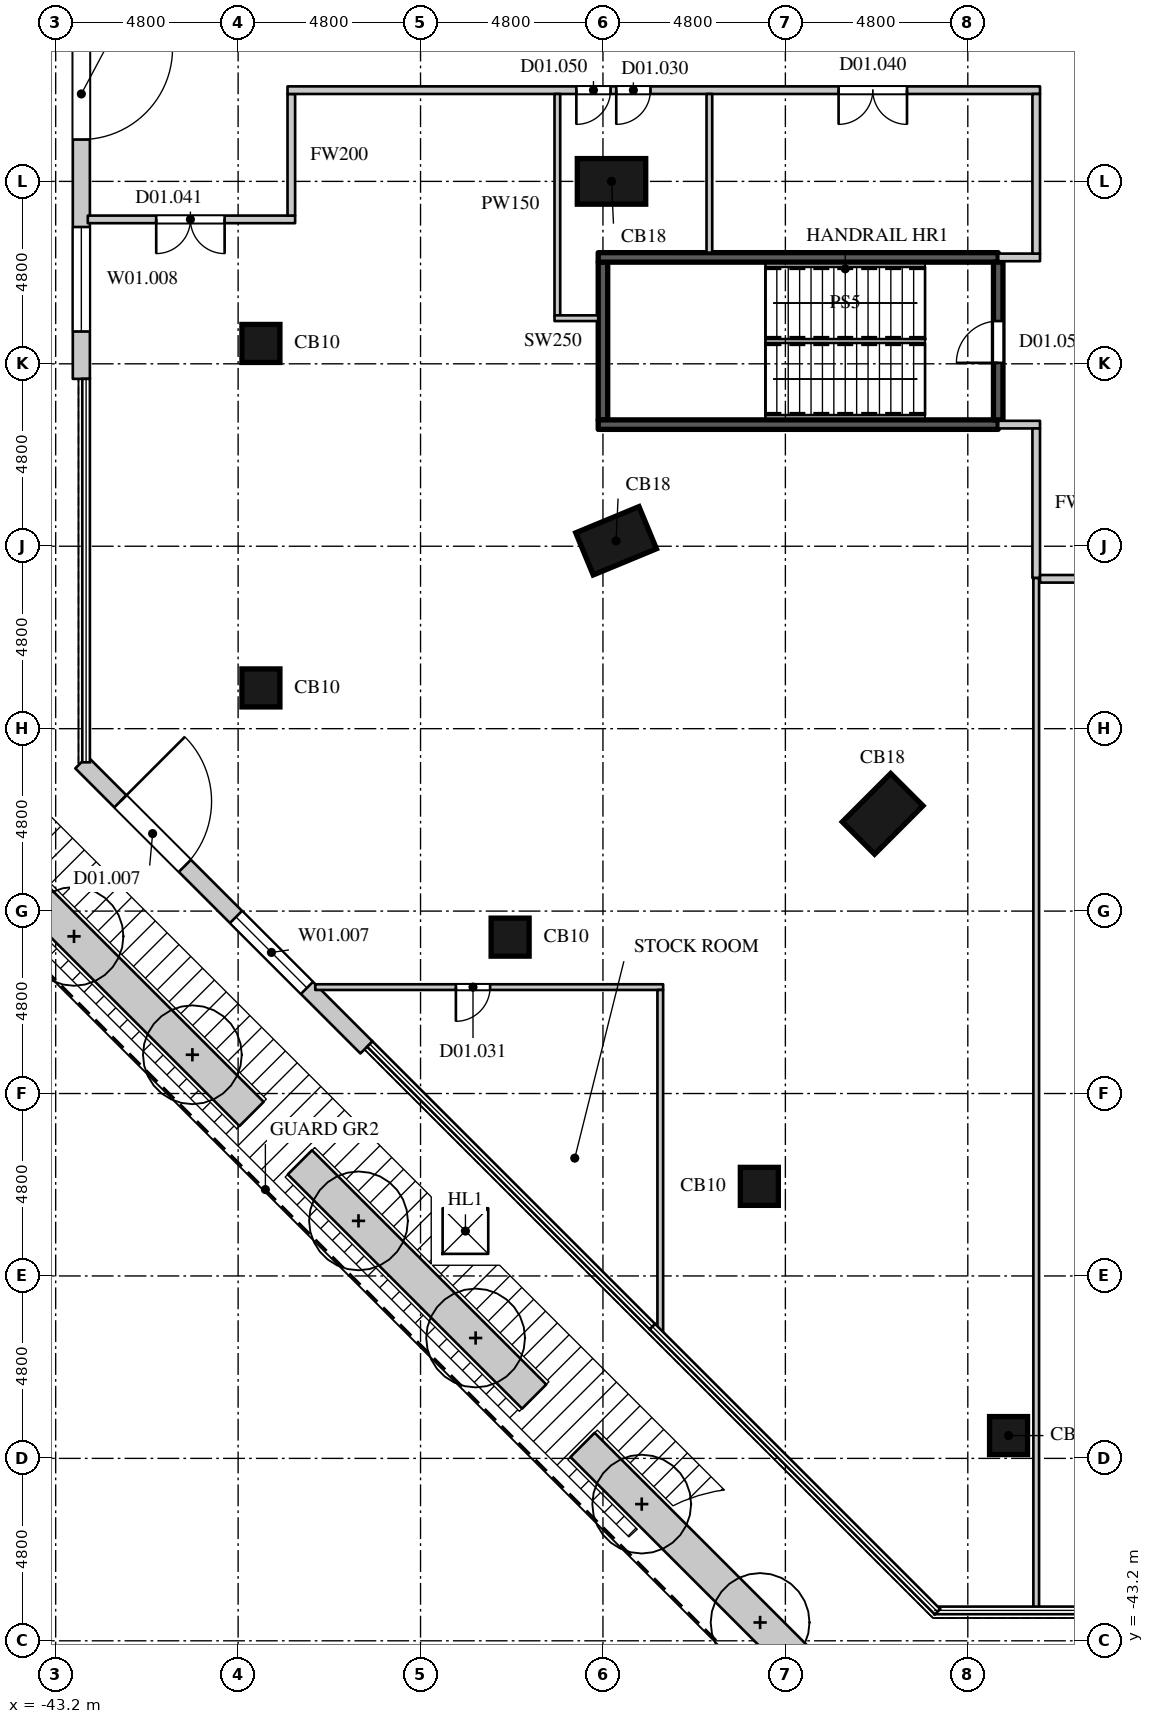
"""IFC4 building model, lengths in metres.
Left out: names, types, materials, properties, quantities, classifications, styles, units other than length and angle.
Written with IfcOpenShell. Run it as: python <this file> out.ifc"""

import sys

from ifc_helpers import new_model, si_unit, direction, frame, frame_2d, origin, origin_2d, place, context, subcontext, project, spatial, rectangle, extrude, element, fill, save


model = new_model("IFC4")
c1 = context("Model", 3, precision=1e-05, world=origin(), true_north=direction((0.0, 1.0)))
c2 = subcontext(c1, "Body", "Model", "MODEL_VIEW")
j1 = project(units=[si_unit("LENGTHUNIT", "METRE"), si_unit("PLANEANGLEUNIT", "RADIAN")], contexts=[c1])
p1 = place(None, origin())
s1 = spatial("IfcSite", under=j1, at=p1, CompositionType="ELEMENT")
p2 = place(p1, origin())
s2 = spatial("IfcBuilding", under=s1, at=p2, CompositionType="ELEMENT")
p3 = place(p2, frame((0.0, 0.0, 6.0)))
s3 = spatial("IfcBuildingStorey", under=s2, at=p3, CompositionType="ELEMENT", Elevation=6.0)
for number, where, z_axis, x_axis in (
    (1, (-18.128, -37.8, 0.0), (0.0, 0.0, 1.0), (1.0, 0.0, 0.0)),
    (2, (-24.685, -31.243, 0.0), (0.0, 0.0, 1.0), (1.0, 0.0, 0.0)),
    (3, (-31.243, -24.685, 0.0), (0.0, 0.0, 1.0), (1.0, 0.0, 0.0)),
):
    element("IfcColumn", number, at=place(p3, frame(where, z_axis=z_axis, x_axis=x_axis)), inside=s3, PredefinedType="COLUMN", context=c2, shape_type="SweptSolid", body=[
        extrude(rectangle(XDim=1.0, YDim=1.0, at=origin_2d()), origin(), (0.0, 0.0, 1.0), 5.0),
    ])
p4 = place(p3, frame((-21.441, -21.441, 0.0), z_axis=(0.0, 0.0, 1.0), x_axis=(0.707106781187, -0.707106781187, 0.0)))
e4 = element("IfcColumn", 4, at=p4, inside=s3, PredefinedType="COLUMN", context=c2, shape_type="SweptSolid", body=[
    extrude(rectangle(XDim=1.2, YDim=1.8, at=origin_2d()), origin(), (0.0, 0.0, 1.0), 5.0),
])
p5 = place(p3, frame((-37.8, -18.128, 0.0), z_axis=(0.0, 0.0, 1.0), x_axis=(1.0, 0.0, 0.0)))
e5 = element("IfcColumn", 5, at=p5, inside=s3, PredefinedType="COLUMN", context=c2, shape_type="SweptSolid", body=[
    extrude(rectangle(XDim=1.0, YDim=1.0, at=origin_2d()), origin(), (0.0, 0.0, 1.0), 5.0),
])
p6 = place(p3, frame((-28.454, -14.257, 0.0), z_axis=(0.0, 0.0, 1.0), x_axis=(0.382683496864, -0.923879505795, 0.0)))
e6 = element("IfcColumn", 6, at=p6, inside=s3, PredefinedType="COLUMN", context=c2, shape_type="SweptSolid", body=[
    extrude(rectangle(XDim=1.2, YDim=1.8, at=origin_2d()), origin(), (0.0, 0.0, 1.0), 5.0),
])
p7 = place(p3, frame((-37.8, -9.064, 0.0), z_axis=(0.0, 0.0, 1.0), x_axis=(1.0, 0.0, 0.0)))
e7 = element("IfcColumn", 7, at=p7, inside=s3, PredefinedType="COLUMN", context=c2, shape_type="SweptSolid", body=[
    extrude(rectangle(XDim=1.0, YDim=1.0, at=origin_2d()), origin(), (0.0, 0.0, 1.0), 5.0),
])
p8 = place(p3, frame((-28.575, -4.8, 0.0), z_axis=(0.0, 0.0, 1.0), x_axis=(0.0, -1.0, 0.0)))
e8 = element("IfcColumn", 8, at=p8, inside=s3, PredefinedType="COLUMN", context=c2, shape_type="SweptSolid", body=[
    extrude(rectangle(XDim=1.2, YDim=1.8, at=origin_2d()), origin(), (0.0, 0.0, 1.0), 5.0),
])
p9 = place(p3, frame((-42.525, 0.0, 0.0), z_axis=(0.0, 0.0, 1.0), x_axis=(0.0, -1.0, 0.0)))
e9 = element("IfcWall", 9, at=p9, inside=s3, PredefinedType="ELEMENTEDWALL", context=c2, shape_type="SweptSolid", body=[
    extrude(rectangle(XDim=9.996, YDim=0.45, at=frame_2d((4.998, 0.0))), origin(), (0.0, 0.0, 1.0), 4.7),
])
p10 = place(p9, frame((1.299, 0.0, 0.0)))
e10 = element("IfcOpeningElement", 10, at=p10, cuts=e9, PredefinedType="OPENING", context=c2, shape_type="SweptSolid", body=[
    extrude(rectangle(XDim=2.4, YDim=2.7, at=frame_2d((1.2, 1.35))), frame((0.0, 0.235, 0.0), z_axis=(0.0, -1.0, 0.0), x_axis=(1.0, 0.0, 0.0)), (0.0, 0.0, 1.0), 0.47),
])
p11 = place(p9, frame((6.0, 0.0, 1.05)))
e11 = element("IfcOpeningElement", 11, at=p11, cuts=e9, PredefinedType="OPENING", context=c2, shape_type="SweptSolid", body=[
    extrude(rectangle(XDim=2.75, YDim=2.7, at=frame_2d((1.375, 1.35))), frame((0.0, 0.235, 0.0), z_axis=(0.0, -1.0, 0.0), x_axis=(1.0, 0.0, 0.0)), (0.0, 0.0, 1.0), 0.47),
])
p12 = place(p3, frame((-42.525, -20.085, 0.0), z_axis=(0.0, 0.0, 1.0), x_axis=(0.707106781187, -0.707106781187, 0.0)))
e12 = element("IfcWall", 12, at=p12, inside=s3, PredefinedType="ELEMENTEDWALL", context=c2, shape_type="SweptSolid", body=[
    extrude(rectangle(XDim=10.609, YDim=0.45, at=frame_2d((5.305, 0.0))), origin(), (0.0, 0.0, 1.0), 4.7),
])
p13 = place(p12, frame((1.452, 0.0, 0.0)))
e13 = element("IfcOpeningElement", 13, at=p13, cuts=e12, PredefinedType="OPENING", context=c2, shape_type="SweptSolid", body=[
    extrude(rectangle(XDim=2.4, YDim=2.7, at=frame_2d((1.2, 1.35))), frame((0.0, 0.235, 0.0), z_axis=(0.0, -1.0, 0.0), x_axis=(1.0, 0.0, 0.0)), (0.0, 0.0, 1.0), 0.47),
])
p14 = place(p12, frame((5.755, 0.0, 1.05)))
e14 = element("IfcOpeningElement", 14, at=p14, cuts=e12, PredefinedType="OPENING", context=c2, shape_type="SweptSolid", body=[
    extrude(rectangle(XDim=2.64, YDim=2.7, at=frame_2d((1.32, 1.35))), frame((0.0, 0.235, 0.0), z_axis=(0.0, -1.0, 0.0), x_axis=(1.0, 0.0, 0.0)), (0.0, 0.0, 1.0), 0.47),
])
p15 = place(p3, frame((-44.275, -23.108, 0.0), z_axis=(0.0, 0.0, 1.0), x_axis=(0.707106781187, -0.707106781187, 0.0)))
e15 = element("IfcWall", 15, at=p15, inside=s3, PredefinedType="USERDEFINED", context=c2, shape_type="SweptSolid", body=[
    extrude(rectangle(XDim=8.81, YDim=0.9, at=frame_2d((4.405, 0.0))), origin(), (0.0, 0.0, 1.0), 0.9),
])
p16 = place(p3, frame((-36.773, -30.61, 0.0), z_axis=(0.0, 0.0, 1.0), x_axis=(0.707106781187, -0.707106781187, 0.0)))
e16 = element("IfcWall", 16, at=p16, inside=s3, PredefinedType="USERDEFINED", context=c2, shape_type="SweptSolid", body=[
    extrude(rectangle(XDim=8.716, YDim=0.9, at=frame_2d((4.358, 0.0))), origin(), (0.0, 0.0, 1.0), 0.9),
])
p17 = place(p3, frame((-29.337, -38.046, 0.0), z_axis=(0.0, 0.0, 1.0), x_axis=(0.707106781187, -0.707106781187, 0.0)))
e17 = element("IfcWall", 17, at=p17, inside=s3, PredefinedType="USERDEFINED", context=c2, shape_type="SweptSolid", body=[
    extrude(rectangle(XDim=8.81, YDim=0.9, at=frame_2d((4.405, 0.0))), origin(), (0.0, 0.0, 1.0), 0.9),
])
p18 = place(p3, frame((-42.355, -5.8, 0.0), z_axis=(0.0, 0.0, 1.0), x_axis=(1.0, 0.0, 0.0)))
e18 = element("IfcWall", 18, at=p18, inside=s3, PredefinedType="PARTITIONING", context=c2, shape_type="SweptSolid", body=[
    extrude(rectangle(XDim=5.455, YDim=0.2, at=frame_2d((2.728, 0.0))), origin(), (0.0, 0.0, 1.0), 4.4),
])
p19 = place(p18, frame((1.8, 0.0, 0.0)))
e19 = element("IfcOpeningElement", 19, at=p19, cuts=e18, PredefinedType="OPENING", context=c2, shape_type="SweptSolid", body=[
    extrude(rectangle(XDim=1.8, YDim=2.4, at=frame_2d((0.9, 1.2))), frame((0.0, 0.11, 0.0), z_axis=(0.0, -1.0, 0.0), x_axis=(1.0, 0.0, 0.0)), (0.0, 0.0, 1.0), 0.22),
])
p20 = place(p3, frame((-37.0, -5.7, 0.0), z_axis=(0.0, 0.0, 1.0), x_axis=(0.0, 1.0, 0.0)))
e20 = element("IfcWall", 20, at=p20, inside=s3, PredefinedType="PARTITIONING", context=c2, shape_type="SweptSolid", body=[
    extrude(rectangle(XDim=3.2, YDim=0.2, at=frame_2d((1.6, 0.0))), origin(), (0.0, 0.0, 1.0), 4.4),
])
p21 = place(p3, frame((-37.1, -2.4, 0.0), z_axis=(0.0, 0.0, 1.0), x_axis=(1.0, 0.0, 0.0)))
e21 = element("IfcWall", 21, at=p21, inside=s3, PredefinedType="PARTITIONING", context=c2, shape_type="SweptSolid", body=[
    extrude(rectangle(XDim=19.8, YDim=0.2, at=frame_2d((9.9, 0.0))), origin(), (0.0, 0.0, 1.0), 4.4),
])
p22 = place(p21, frame((8.65, 0.0, 0.0)))
e22 = element("IfcOpeningElement", 22, at=p22, cuts=e21, PredefinedType="OPENING", context=c2, shape_type="SweptSolid", body=[
    extrude(rectangle(XDim=0.9, YDim=2.2, at=frame_2d((0.45, 1.1))), frame((0.0, 0.11, 0.0), z_axis=(0.0, -1.0, 0.0), x_axis=(1.0, 0.0, 0.0)), (0.0, 0.0, 1.0), 0.22),
])
p23 = place(p21, frame((14.5, 0.0, 0.0)))
e23 = element("IfcOpeningElement", 23, at=p23, cuts=e21, PredefinedType="OPENING", context=c2, shape_type="SweptSolid", body=[
    extrude(rectangle(XDim=1.8, YDim=2.4, at=frame_2d((0.9, 1.2))), frame((0.0, 0.11, 0.0), z_axis=(0.0, -1.0, 0.0), x_axis=(1.0, 0.0, 0.0)), (0.0, 0.0, 1.0), 0.22),
])
p24 = place(p21, frame((7.6, 0.0, 0.0)))
e24 = element("IfcOpeningElement", 24, at=p24, cuts=e21, PredefinedType="OPENING", context=c2, shape_type="SweptSolid", body=[
    extrude(rectangle(XDim=0.9, YDim=2.2, at=frame_2d((0.45, 1.1))), frame((0.0, 0.11, 0.0), z_axis=(0.0, -1.0, 0.0), x_axis=(1.0, 0.0, 0.0)), (0.0, 0.0, 1.0), 0.22),
])
for number, where, z_axis, x_axis in (
    (25, (-18.4, -11.2, 0.0), (0.0, 0.0, 1.0), (1.0, 0.0, 0.0)),
    (26, (-18.4, -6.8, 0.0), (0.0, 0.0, 1.0), (1.0, 0.0, 0.0)),
):
    element("IfcWall", number, at=place(p3, frame(where, z_axis=z_axis, x_axis=x_axis)), inside=s3, PredefinedType="PARTITIONING", context=c2, shape_type="SweptSolid", body=[
        extrude(rectangle(XDim=1.1, YDim=0.2, at=frame_2d((0.55, 0.0))), origin(), (0.0, 0.0, 1.0), 4.4),
    ])
p25 = place(p3, frame((-17.4, -15.237, 0.0), z_axis=(0.0, 0.0, 1.0), x_axis=(0.0, 1.0, 0.0)))
e27 = element("IfcWall", 27, at=p25, inside=s3, PredefinedType="PARTITIONING", context=c2, shape_type="SweptSolid", body=[
    extrude(rectangle(XDim=3.937, YDim=0.2, at=frame_2d((1.968, 0.0))), origin(), (0.0, 0.0, 1.0), 4.4),
])
p26 = place(p3, frame((-17.3, -15.257, 0.0), z_axis=(0.0, 0.0, 1.0), x_axis=(1.0, 0.0, 0.0)))
e28 = element("IfcWall", 28, at=p26, inside=s3, PredefinedType="PARTITIONING", context=c2, shape_type="SweptSolid", body=[
    extrude(rectangle(XDim=6.2, YDim=0.2, at=frame_2d((3.1, 0.0))), origin(), (0.0, 0.0, 1.0), 4.4),
])
p27 = place(p26, frame((2.2, 0.0, 0.0)))
e29 = element("IfcOpeningElement", 29, at=p27, cuts=e28, PredefinedType="OPENING", context=c2, shape_type="SweptSolid", body=[
    extrude(rectangle(XDim=1.8, YDim=2.4, at=frame_2d((0.9, 1.2))), frame((0.0, 0.11, 0.0), z_axis=(0.0, -1.0, 0.0), x_axis=(1.0, 0.0, 0.0)), (0.0, 0.0, 1.0), 0.22),
])
p28 = place(p3, frame((-17.4, -6.7, 0.0), z_axis=(0.0, 0.0, 1.0), x_axis=(0.0, 1.0, 0.0)))
e30 = element("IfcWall", 30, at=p28, inside=s3, PredefinedType="PARTITIONING", context=c2, shape_type="SweptSolid", body=[
    extrude(rectangle(XDim=4.2, YDim=0.2, at=frame_2d((2.1, 0.0))), origin(), (0.0, 0.0, 1.0), 4.4),
])
p29 = place(p3, frame((-36.37, -26.0, 0.0), z_axis=(0.0, 0.0, 1.0), x_axis=(1.0, 0.0, 0.0)))
e31 = element("IfcWall", 31, at=p29, inside=s3, PredefinedType="PARTITIONING", context=c2, shape_type="SweptSolid", body=[
    extrude(rectangle(XDim=9.153, YDim=0.15, at=frame_2d((4.576, 0.0))), origin(), (0.0, 0.0, 1.0), 4.4),
])
p30 = place(p29, frame((3.7, 0.0, 0.0)))
e32 = element("IfcOpeningElement", 32, at=p30, cuts=e31, PredefinedType="OPENING", context=c2, shape_type="SweptSolid", body=[
    extrude(rectangle(XDim=0.9, YDim=2.2, at=frame_2d((0.45, 1.1))), frame((0.0, 0.085, 0.0), z_axis=(0.0, -1.0, 0.0), x_axis=(1.0, 0.0, 0.0)), (0.0, 0.0, 1.0), 0.17),
])
p31 = place(p3, frame((-30.0, -8.325, 0.0), z_axis=(0.0, 0.0, 1.0), x_axis=(0.0, 1.0, 0.0)))
e33 = element("IfcWall", 33, at=p31, inside=s3, PredefinedType="PARTITIONING", context=c2, shape_type="SweptSolid", body=[
    extrude(rectangle(XDim=5.825, YDim=0.15, at=frame_2d((2.913, 0.0))), origin(), (0.0, 0.0, 1.0), 4.4),
])
p32 = place(p3, frame((-30.075, -8.4, 0.0), z_axis=(0.0, 0.0, 1.0), x_axis=(1.0, 0.0, 0.0)))
e34 = element("IfcWall", 34, at=p32, inside=s3, PredefinedType="PARTITIONING", context=c2, shape_type="SweptSolid", body=[
    extrude(rectangle(XDim=1.15, YDim=0.15, at=frame_2d((0.575, 0.0))), origin(), (0.0, 0.0, 1.0), 4.4),
])
p33 = place(p3, frame((-27.292, -35.078, 0.0), z_axis=(0.0, 0.0, 1.0), x_axis=(0.0, 1.0, 0.0)))
e35 = element("IfcWall", 35, at=p33, inside=s3, PredefinedType="PARTITIONING", context=c2, shape_type="SweptSolid", body=[
    extrude(rectangle(XDim=9.003, YDim=0.15, at=frame_2d((4.501, 0.0))), origin(), (0.0, 0.0, 1.0), 4.4),
])
p34 = place(p3, frame((-26.0, -6.675, 0.0), z_axis=(0.0, 0.0, 1.0), x_axis=(0.0, 1.0, 0.0)))
e36 = element("IfcWall", 36, at=p34, inside=s3, PredefinedType="PARTITIONING", context=c2, shape_type="SweptSolid", body=[
    extrude(rectangle(XDim=4.175, YDim=0.15, at=frame_2d((2.087, 0.0))), origin(), (0.0, 0.0, 1.0), 4.4),
])
p35 = place(p3, frame((-17.4, -42.355, 0.0), z_axis=(0.0, 0.0, 1.0), x_axis=(0.0, 1.0, 0.0)))
e37 = element("IfcWall", 37, at=p35, inside=s3, PredefinedType="PARTITIONING", context=c2, shape_type="SweptSolid", body=[
    extrude(rectangle(XDim=27.118, YDim=0.15, at=frame_2d((13.559, 0.0))), origin(), (0.0, 0.0, 1.0), 4.4),
])
p36 = place(p3, frame((-28.8, -11.075, 0.0), z_axis=(0.0, 0.0, 1.0), x_axis=(0.0, 1.0, 0.0)))
e38 = element("IfcWall", 38, at=p36, inside=s3, PredefinedType="SHEAR", context=c2, shape_type="SweptSolid", body=[
    extrude(rectangle(XDim=4.15, YDim=0.25, at=frame_2d((2.075, 0.0))), origin(), (0.0, 0.0, 1.0), 4.65),
])
for number, where, z_axis, x_axis in (
    (39, (-28.925, -11.2, 0.0), (0.0, 0.0, 1.0), (1.0, 0.0, 0.0)),
    (40, (-28.925, -6.8, 0.0), (0.0, 0.0, 1.0), (1.0, 0.0, 0.0)),
):
    element("IfcWall", number, at=place(p3, frame(where, z_axis=z_axis, x_axis=x_axis)), inside=s3, PredefinedType="SHEAR", context=c2, shape_type="SweptSolid", body=[
        extrude(rectangle(XDim=10.525, YDim=0.25, at=frame_2d((5.263, 0.0))), origin(), (0.0, 0.0, 1.0), 4.65),
    ])
p37 = place(p3, frame((-18.4, -11.075, 0.0), z_axis=(0.0, 0.0, 1.0), x_axis=(0.0, 1.0, 0.0)))
e41 = element("IfcWall", 41, at=p37, inside=s3, PredefinedType="SHEAR", context=c2, shape_type="SweptSolid", body=[
    extrude(rectangle(XDim=4.15, YDim=0.25, at=frame_2d((2.075, 0.0))), origin(), (0.0, 0.0, 1.0), 4.65),
])
p38 = place(p37, frame((1.5, 0.0, 0.0)))
e42 = element("IfcOpeningElement", 42, at=p38, cuts=e41, PredefinedType="OPENING", context=c2, shape_type="SweptSolid", body=[
    extrude(rectangle(XDim=1.1, YDim=2.2, at=frame_2d((0.55, 1.1))), frame((0.0, 0.135, 0.0), z_axis=(0.0, -1.0, 0.0), x_axis=(1.0, 0.0, 0.0)), (0.0, 0.0, 1.0), 0.27),
])
p39 = place(p10, origin())
e43 = element("IfcDoor", 43, at=p39, inside=s3, OperationType="SINGLE_SWING_LEFT", PredefinedType="DOOR", context=c2, shape_type="SweptSolid", body=[
    extrude(rectangle(XDim=2.4, YDim=2.7, at=frame_2d((1.2, 1.35))), frame((0.0, 0.13, 0.0), z_axis=(0.0, -1.0, 0.0), x_axis=(1.0, 0.0, 0.0)), (0.0, 0.0, 1.0), 0.05),
])
fill(e10, e43)
p40 = place(p11, origin())
e44 = element("IfcWindow", 44, at=p40, inside=s3, PartitioningType="SINGLE_PANEL", PredefinedType="WINDOW", context=c2, shape_type="SweptSolid", body=[
    extrude(rectangle(XDim=2.75, YDim=2.7, at=frame_2d((1.375, 1.35))), frame((0.0, 0.135, 0.0), z_axis=(0.0, -1.0, 0.0), x_axis=(1.0, 0.0, 0.0)), (0.0, 0.0, 1.0), 0.06),
])
fill(e11, e44)
p41 = place(p13, origin())
e45 = element("IfcDoor", 45, at=p41, inside=s3, OperationType="SINGLE_SWING_LEFT", PredefinedType="DOOR", context=c2, shape_type="SweptSolid", body=[
    extrude(rectangle(XDim=2.4, YDim=2.7, at=frame_2d((1.2, 1.35))), frame((0.0, 0.13, 0.0), z_axis=(0.0, -1.0, 0.0), x_axis=(1.0, 0.0, 0.0)), (0.0, 0.0, 1.0), 0.05),
])
fill(e13, e45)
p42 = place(p14, origin())
e46 = element("IfcWindow", 46, at=p42, inside=s3, PartitioningType="SINGLE_PANEL", PredefinedType="WINDOW", context=c2, shape_type="SweptSolid", body=[
    extrude(rectangle(XDim=2.64, YDim=2.7, at=frame_2d((1.32, 1.35))), frame((0.0, 0.135, 0.0), z_axis=(0.0, -1.0, 0.0), x_axis=(1.0, 0.0, 0.0)), (0.0, 0.0, 1.0), 0.06),
])
fill(e14, e46)
p43 = place(p3, frame((0.0, 0.0, -0.35)))
p44 = place(p43, frame((-32.419, -32.419, 0.0)))
p45 = place(p44, frame((0.0, 0.0, 0.3)))
e47 = element("IfcWindow", 47, at=p45, inside=s3, PartitioningType="SINGLE_PANEL", PredefinedType="SKYLIGHT", context=c2, shape_type="SweptSolid", body=[
    extrude(rectangle(XDim=1.2, YDim=1.2, at=origin_2d()), origin(), (0.0, 0.0, 1.0), 0.05),
])
p46 = place(p22, origin())
e48 = element("IfcDoor", 48, at=p46, inside=s3, OperationType="SINGLE_SWING_RIGHT", PredefinedType="DOOR", context=c2, shape_type="SweptSolid", body=[
    extrude(rectangle(XDim=0.9, YDim=2.2, at=frame_2d((0.45, 1.1))), frame((0.0, 0.025, 0.0), z_axis=(0.0, -1.0, 0.0), x_axis=(1.0, 0.0, 0.0)), (0.0, 0.0, 1.0), 0.05),
])
fill(e22, e48)
p47 = place(p30, origin())
e49 = element("IfcDoor", 49, at=p47, inside=s3, OperationType="SINGLE_SWING_RIGHT", PredefinedType="DOOR", context=c2, shape_type="SweptSolid", body=[
    extrude(rectangle(XDim=0.9, YDim=2.2, at=frame_2d((0.45, 1.1))), frame((0.0, 0.025, 0.0), z_axis=(0.0, -1.0, 0.0), x_axis=(1.0, 0.0, 0.0)), (0.0, 0.0, 1.0), 0.05),
])
fill(e32, e49)
p48 = place(p23, origin())
e50 = element("IfcDoor", 50, at=p48, inside=s3, OperationType="DOUBLE_DOOR_SINGLE_SWING", PredefinedType="DOOR", context=c2, shape_type="SweptSolid", body=[
    extrude(rectangle(XDim=1.8, YDim=2.4, at=frame_2d((0.9, 1.2))), frame((0.0, 0.025, 0.0), z_axis=(0.0, -1.0, 0.0), x_axis=(1.0, 0.0, 0.0)), (0.0, 0.0, 1.0), 0.05),
])
fill(e23, e50)
p49 = place(p19, origin())
e51 = element("IfcDoor", 51, at=p49, inside=s3, OperationType="DOUBLE_DOOR_SINGLE_SWING", PredefinedType="DOOR", context=c2, shape_type="SweptSolid", body=[
    extrude(rectangle(XDim=1.8, YDim=2.4, at=frame_2d((0.9, 1.2))), frame((0.0, 0.025, 0.0), z_axis=(0.0, -1.0, 0.0), x_axis=(1.0, 0.0, 0.0)), (0.0, 0.0, 1.0), 0.05),
])
fill(e19, e51)
p50 = place(p24, origin())
e52 = element("IfcDoor", 52, at=p50, inside=s3, OperationType="SINGLE_SWING_RIGHT", PredefinedType="DOOR", context=c2, shape_type="SweptSolid", body=[
    extrude(rectangle(XDim=0.9, YDim=2.2, at=frame_2d((0.45, 1.1))), frame((0.0, 0.025, 0.0), z_axis=(0.0, -1.0, 0.0), x_axis=(1.0, 0.0, 0.0)), (0.0, 0.0, 1.0), 0.05),
])
fill(e24, e52)
p51 = place(p38, origin())
e53 = element("IfcDoor", 53, at=p51, inside=s3, OperationType="SINGLE_SWING_LEFT", PredefinedType="DOOR", context=c2, shape_type="SweptSolid", body=[
    extrude(rectangle(XDim=1.1, YDim=2.2, at=frame_2d((0.55, 1.1))), frame((0.0, 0.025, 0.0), z_axis=(0.0, -1.0, 0.0), x_axis=(1.0, 0.0, 0.0)), (0.0, 0.0, 1.0), 0.05),
])
fill(e42, e53)
save(model, sys.argv[1])
